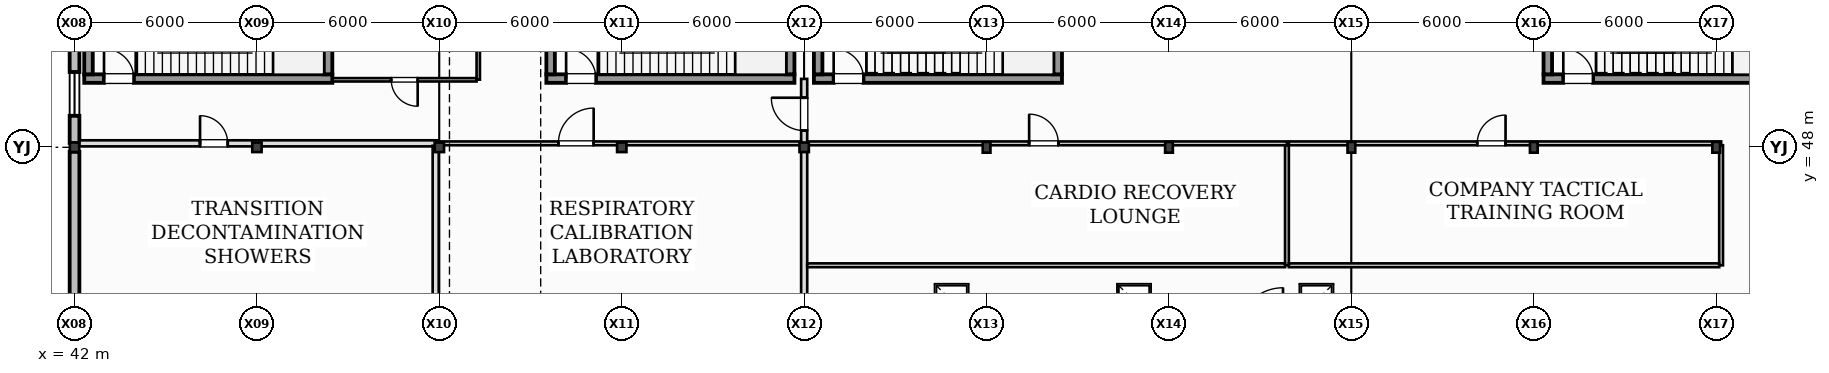
"""IFC4 building model, lengths in metres.
Left out: names, types, materials, properties, quantities, classifications, styles, units other than length and angle.
Written with IfcOpenShell. Run it as: python <this file> out.ifc"""

import sys

from ifc_helpers import new_model, si_unit, direction, frame, frame_2d, origin, origin_2d, place, context, subcontext, project, spatial, rectangle, i_section, extrude, element, fill, save


model = new_model("IFC4")
c1 = context("Model", 3, precision=1e-05, world=origin(), true_north=direction((0.0, 1.0)))
c2 = subcontext(c1, "Body", "Model", "MODEL_VIEW")
j1 = project(units=[si_unit("LENGTHUNIT", "METRE"), si_unit("PLANEANGLEUNIT", "RADIAN")], contexts=[c1])
p1 = place(None, origin())
s1 = spatial("IfcSite", under=j1, at=p1, CompositionType="ELEMENT")
p2 = place(p1, origin())
s2 = spatial("IfcBuilding", under=s1, at=p2, CompositionType="ELEMENT")
p3 = place(p2, frame((0.0, 0.0, 6.0)))
s3 = spatial("IfcBuildingStorey", under=s2, at=p3, CompositionType="ELEMENT", Elevation=6.0)
for number, where, z_axis, x_axis in (
    (1, (42.0, 48.0, 0.0), (0.0, 0.0, 1.0), (1.0, 0.0, 0.0)),
    (2, (48.0, 48.0, 0.0), (0.0, 0.0, 1.0), (1.0, 0.0, 0.0)),
    (3, (54.0, 48.0, 0.0), (0.0, 0.0, 1.0), (1.0, 0.0, 0.0)),
    (4, (60.0, 48.0, 0.0), (0.0, 0.0, 1.0), (1.0, 0.0, 0.0)),
    (5, (66.0, 48.0, 0.0), (0.0, 0.0, 1.0), (1.0, 0.0, 0.0)),
):
    element("IfcColumn", number, at=place(p3, frame(where, z_axis=z_axis, x_axis=x_axis)), inside=s3, PredefinedType="COLUMN", context=c2, shape_type="SweptSolid", body=[
        extrude(i_section(OverallWidth=0.307, OverallDepth=0.314, WebThickness=0.011, FlangeThickness=0.019, at=origin_2d()), origin(), (0.0, 0.0, 1.0), 4.0),
    ])
for number, where, z_axis, x_axis in (
    (6, (72.0, 48.0, 0.0), (0.0, 0.0, 1.0), (1.0, 0.0, 0.0)),
    (7, (78.0, 48.0, 0.0), (0.0, 0.0, 1.0), (1.0, 0.0, 0.0)),
    (8, (84.0, 48.0, 0.0), (0.0, 0.0, 1.0), (1.0, 0.0, 0.0)),
    (9, (90.0, 48.0, 0.0), (0.0, 0.0, 1.0), (1.0, 0.0, 0.0)),
    (10, (96.0, 48.0, 0.0), (0.0, 0.0, 1.0), (1.0, 0.0, 0.0)),
):
    element("IfcColumn", number, at=place(p3, frame(where, z_axis=z_axis, x_axis=x_axis)), inside=s3, PredefinedType="COLUMN", context=c2, shape_type="SweptSolid", body=[
        extrude(i_section(OverallWidth=0.254, OverallDepth=0.353, WebThickness=0.01, FlangeThickness=0.016, at=origin_2d()), origin(), (0.0, 0.0, 1.0), 4.0),
    ])
p4 = place(p3, frame((42.0, 47.855, 0.0), z_axis=(0.0, 0.0, 1.0), x_axis=(0.0, -1.0, 0.0)))
e11 = element("IfcWall", 11, at=p4, inside=s3, PredefinedType="STANDARD", context=c2, shape_type="SweptSolid", body=[
    extrude(rectangle(XDim=5.71, YDim=0.32, at=frame_2d((2.855, 0.0))), origin(), (0.0, 0.0, 1.0), 3.339),
])
p5 = place(p3, frame((42.0, 53.855, 0.0), z_axis=(0.0, 0.0, 1.0), x_axis=(0.0, -1.0, 0.0)))
e12 = element("IfcWall", 12, at=p5, inside=s3, PredefinedType="STANDARD", context=c2, shape_type="SweptSolid", body=[
    extrude(rectangle(XDim=5.71, YDim=0.32, at=frame_2d((2.855, 0.0))), origin(), (0.0, 0.0, 1.0), 3.339),
])
p6 = place(p5, frame((0.936, 0.0, 0.86)))
e13 = element("IfcOpeningElement", 13, at=p6, cuts=e12, PredefinedType="OPENING", context=c2, shape_type="SweptSolid", body=[
    extrude(rectangle(XDim=1.2, YDim=1.2, at=frame_2d((0.6, 0.6))), frame((0.0, 0.17, 0.0), z_axis=(0.0, -1.0, 0.0), x_axis=(1.0, 0.0, 0.0)), (0.0, 0.0, 1.0), 0.34),
])
p7 = place(p5, frame((3.378, 0.0, 1.42)))
e14 = element("IfcOpeningElement", 14, at=p7, cuts=e12, PredefinedType="OPENING", context=c2, shape_type="SweptSolid", body=[
    extrude(rectangle(XDim=1.44, YDim=1.44, at=frame_2d((0.72, 0.72))), frame((0.0, 0.17, 0.0), z_axis=(0.0, -1.0, 0.0), x_axis=(1.0, 0.0, 0.0)), (0.0, 0.0, 1.0), 0.34),
])
p8 = place(p3, frame((42.32, 50.26, 0.0), z_axis=(0.0, 0.0, 1.0), x_axis=(1.0, 0.0, 0.0)))
e15 = element("IfcWall", 15, at=p8, inside=s3, PredefinedType="SHEAR", context=c2, shape_type="SweptSolid", body=[
    extrude(rectangle(XDim=8.16, YDim=0.28, at=frame_2d((4.08, 0.0))), origin(), (0.0, 0.0, 1.0), 3.75),
])
p9 = place(p8, frame((0.65, 0.0, 0.0)))
e16 = element("IfcOpeningElement", 16, at=p9, cuts=e15, PredefinedType="OPENING", context=c2, shape_type="SweptSolid", body=[
    extrude(rectangle(XDim=0.98, YDim=2.15, at=frame_2d((0.49, 1.075))), frame((0.0, 0.15, 0.0), z_axis=(0.0, -1.0, 0.0), x_axis=(1.0, 0.0, 0.0)), (0.0, 0.0, 1.0), 0.3),
])
for number, where, z_axis, x_axis in (
    (17, (42.46, 53.4, 0.0), (0.0, 0.0, 1.0), (0.0, -1.0, 0.0)),
    (18, (50.34, 50.4, 0.0), (0.0, 0.0, 1.0), (0.0, 1.0, 0.0)),
):
    element("IfcWall", number, at=place(p3, frame(where, z_axis=z_axis, x_axis=x_axis)), inside=s3, PredefinedType="SHEAR", context=c2, shape_type="SweptSolid", body=[
        extrude(rectangle(XDim=3.0, YDim=0.28, at=frame_2d((1.5, 0.0))), origin(), (0.0, 0.0, 1.0), 3.75),
    ])
p10 = place(p3, frame((57.52, 50.26, 0.0), z_axis=(0.0, 0.0, 1.0), x_axis=(1.0, 0.0, 0.0)))
e19 = element("IfcWall", 19, at=p10, inside=s3, PredefinedType="SHEAR", context=c2, shape_type="SweptSolid", body=[
    extrude(rectangle(XDim=8.16, YDim=0.28, at=frame_2d((4.08, 0.0))), origin(), (0.0, 0.0, 1.0), 3.75),
])
p11 = place(p10, frame((0.65, 0.0, 0.0)))
e20 = element("IfcOpeningElement", 20, at=p11, cuts=e19, PredefinedType="OPENING", context=c2, shape_type="SweptSolid", body=[
    extrude(rectangle(XDim=0.98, YDim=2.15, at=frame_2d((0.49, 1.075))), frame((0.0, 0.15, 0.0), z_axis=(0.0, -1.0, 0.0), x_axis=(1.0, 0.0, 0.0)), (0.0, 0.0, 1.0), 0.3),
])
for number, where, z_axis, x_axis in (
    (21, (57.66, 53.4, 0.0), (0.0, 0.0, 1.0), (0.0, -1.0, 0.0)),
    (22, (65.54, 50.4, 0.0), (0.0, 0.0, 1.0), (0.0, 1.0, 0.0)),
):
    element("IfcWall", number, at=place(p3, frame(where, z_axis=z_axis, x_axis=x_axis)), inside=s3, PredefinedType="SHEAR", context=c2, shape_type="SweptSolid", body=[
        extrude(rectangle(XDim=3.0, YDim=0.28, at=frame_2d((1.5, 0.0))), origin(), (0.0, 0.0, 1.0), 3.75),
    ])
p12 = place(p3, frame((90.32, 50.26, 0.0), z_axis=(0.0, 0.0, 1.0), x_axis=(1.0, 0.0, 0.0)))
e23 = element("IfcWall", 23, at=p12, inside=s3, PredefinedType="SHEAR", context=c2, shape_type="SweptSolid", body=[
    extrude(rectangle(XDim=8.16, YDim=0.28, at=frame_2d((4.08, 0.0))), origin(), (0.0, 0.0, 1.0), 4.0),
])
p13 = place(p12, frame((0.65, 0.0, 0.0)))
e24 = element("IfcOpeningElement", 24, at=p13, cuts=e23, PredefinedType="OPENING", context=c2, shape_type="SweptSolid", body=[
    extrude(rectangle(XDim=0.98, YDim=2.15, at=frame_2d((0.49, 1.075))), frame((0.0, 0.15, 0.0), z_axis=(0.0, -1.0, 0.0), x_axis=(1.0, 0.0, 0.0)), (0.0, 0.0, 1.0), 0.3),
])
p14 = place(p3, frame((90.46, 53.4, 0.0), z_axis=(0.0, 0.0, 1.0), x_axis=(0.0, -1.0, 0.0)))
e25 = element("IfcWall", 25, at=p14, inside=s3, PredefinedType="SHEAR", context=c2, shape_type="SweptSolid", body=[
    extrude(rectangle(XDim=3.0, YDim=0.28, at=frame_2d((1.5, 0.0))), origin(), (0.0, 0.0, 1.0), 4.0),
])
p15 = place(p3, frame((66.32, 50.26, 0.0), z_axis=(0.0, 0.0, 1.0), x_axis=(1.0, 0.0, 0.0)))
e26 = element("IfcWall", 26, at=p15, inside=s3, PredefinedType="SHEAR", context=c2, shape_type="SweptSolid", body=[
    extrude(rectangle(XDim=8.16, YDim=0.28, at=frame_2d((4.08, 0.0))), origin(), (0.0, 0.0, 1.0), 4.0),
])
p16 = place(p15, frame((0.65, 0.0, 0.0)))
e27 = element("IfcOpeningElement", 27, at=p16, cuts=e26, PredefinedType="OPENING", context=c2, shape_type="SweptSolid", body=[
    extrude(rectangle(XDim=0.98, YDim=2.15, at=frame_2d((0.49, 1.075))), frame((0.0, 0.15, 0.0), z_axis=(0.0, -1.0, 0.0), x_axis=(1.0, 0.0, 0.0)), (0.0, 0.0, 1.0), 0.3),
])
for number, where, z_axis, x_axis in (
    (28, (66.46, 53.4, 0.0), (0.0, 0.0, 1.0), (0.0, -1.0, 0.0)),
    (29, (74.34, 50.4, 0.0), (0.0, 0.0, 1.0), (0.0, 1.0, 0.0)),
):
    element("IfcWall", number, at=place(p3, frame(where, z_axis=z_axis, x_axis=x_axis)), inside=s3, PredefinedType="SHEAR", context=c2, shape_type="SweptSolid", body=[
        extrude(rectangle(XDim=3.0, YDim=0.28, at=frame_2d((1.5, 0.0))), origin(), (0.0, 0.0, 1.0), 4.0),
    ])
p17 = place(p3, frame((66.0, 42.18, 0.0), z_axis=(0.0, 0.0, 1.0), x_axis=(0.0, 1.0, 0.0)))
e30 = element("IfcWall", 30, at=p17, inside=s3, PredefinedType="PARTITIONING", context=c2, shape_type="SweptSolid", body=[
    extrude(rectangle(XDim=5.72, YDim=0.2, at=frame_2d((2.86, 0.0))), origin(), (0.0, 0.0, 1.0), 3.65),
])
p18 = place(p3, frame((66.0, 48.05, 0.0), z_axis=(0.0, 0.0, 1.0), x_axis=(0.0, 1.0, 0.0)))
e31 = element("IfcWall", 31, at=p18, inside=s3, PredefinedType="PARTITIONING", context=c2, shape_type="SweptSolid", body=[
    extrude(rectangle(XDim=2.2, YDim=0.2, at=frame_2d((1.1, 0.0))), origin(), (0.0, 0.0, 1.0), 3.65),
])
p19 = place(p18, frame((0.5, 0.0, 0.0)))
e32 = element("IfcOpeningElement", 32, at=p19, cuts=e31, PredefinedType="OPENING", context=c2, shape_type="SweptSolid", body=[
    extrude(rectangle(XDim=1.08, YDim=2.14, at=frame_2d((0.54, 1.07))), frame((0.0, 0.11, 0.0), z_axis=(0.0, -1.0, 0.0), x_axis=(1.0, 0.0, 0.0)), (0.0, 0.0, 1.0), 0.22),
])
p20 = place(p3, frame((42.16, 48.13, 0.0), z_axis=(0.0, 0.0, 1.0), x_axis=(1.0, 0.0, 0.0)))
e33 = element("IfcWall", 33, at=p20, inside=s3, PredefinedType="PARTITIONING", context=c2, shape_type="SweptSolid", body=[
    extrude(rectangle(XDim=11.76, YDim=0.2, at=frame_2d((5.88, 0.0))), origin(), (0.0, 0.0, 1.0), 3.72),
])
p21 = place(p20, frame((3.969, 0.0, 0.0)))
e34 = element("IfcOpeningElement", 34, at=p21, cuts=e33, PredefinedType="OPENING", context=c2, shape_type="SweptSolid", body=[
    extrude(rectangle(XDim=0.91, YDim=2.1, at=frame_2d((0.455, 1.05))), frame((0.0, 0.11, 0.0), z_axis=(0.0, -1.0, 0.0), x_axis=(1.0, 0.0, 0.0)), (0.0, 0.0, 1.0), 0.22),
])
p22 = place(p3, frame((53.88, 48.05, 0.0), z_axis=(0.0, 0.0, 1.0), x_axis=(0.0, -1.0, 0.0)))
e35 = element("IfcWall", 35, at=p22, inside=s3, PredefinedType="PARTITIONING", context=c2, shape_type="SweptSolid", body=[
    extrude(rectangle(XDim=5.92, YDim=0.2, at=frame_2d((2.96, 0.0))), origin(), (0.0, 0.0, 1.0), 3.72),
])
p23 = place(p3, frame((53.98, 48.13, 0.0), z_axis=(0.0, 0.0, 1.0), x_axis=(1.0, 0.0, 0.0)))
e36 = element("IfcWall", 36, at=p23, inside=s3, PredefinedType="PARTITIONING", context=c2, shape_type="SweptSolid", body=[
    extrude(rectangle(XDim=11.92, YDim=0.125, at=frame_2d((5.96, 0.0))), origin(), (0.0, 0.0, 1.0), 3.72),
])
p24 = place(p23, frame((3.936, 0.0, 0.0)))
e37 = element("IfcOpeningElement", 37, at=p24, cuts=e36, PredefinedType="OPENING", context=c2, shape_type="SweptSolid", body=[
    extrude(rectangle(XDim=1.16, YDim=2.2, at=frame_2d((0.58, 1.1))), frame((0.0, 0.073, 0.0), z_axis=(0.0, -1.0, 0.0), x_axis=(1.0, 0.0, 0.0)), (0.0, 0.0, 1.0), 0.145),
])
p25 = place(p3, frame((55.28, 53.84, 0.0), z_axis=(0.0, 0.0, 1.0), x_axis=(0.0, -1.0, 0.0)))
e38 = element("IfcWall", 38, at=p25, inside=s3, PredefinedType="PARTITIONING", context=c2, shape_type="SweptSolid", body=[
    extrude(rectangle(XDim=3.615, YDim=0.11, at=frame_2d((1.808, 0.0))), origin(), (0.0, 0.0, 1.0), 3.72),
])
p26 = place(p3, frame((55.225, 50.22, 0.0), z_axis=(0.0, 0.0, 1.0), x_axis=(-1.0, 0.0, 0.0)))
e39 = element("IfcWall", 39, at=p26, inside=s3, PredefinedType="PARTITIONING", context=c2, shape_type="SweptSolid", body=[
    extrude(rectangle(XDim=4.745, YDim=0.11, at=frame_2d((2.373, 0.0))), origin(), (0.0, 0.0, 1.0), 3.72),
])
p27 = place(p26, frame((1.938, 0.0, 0.0)))
e40 = element("IfcOpeningElement", 40, at=p27, cuts=e39, PredefinedType="OPENING", context=c2, shape_type="SweptSolid", body=[
    extrude(rectangle(XDim=0.87, YDim=2.06, at=frame_2d((0.435, 1.03))), frame((0.0, 0.065, 0.0), z_axis=(0.0, -1.0, 0.0), x_axis=(1.0, 0.0, 0.0)), (0.0, 0.0, 1.0), 0.13),
])
p28 = place(p3, frame((66.1, 48.13, 0.0), z_axis=(0.0, 0.0, 1.0), x_axis=(1.0, 0.0, 0.0)))
e41 = element("IfcWall", 41, at=p28, inside=s3, PredefinedType="PARTITIONING", context=c2, shape_type="SweptSolid", body=[
    extrude(rectangle(XDim=15.782, YDim=0.125, at=frame_2d((7.891, 0.0))), origin(), (0.0, 0.0, 1.0), 3.153),
])
p29 = place(p28, frame((7.3, 0.0, 0.0)))
e42 = element("IfcOpeningElement", 42, at=p29, cuts=e41, PredefinedType="OPENING", context=c2, shape_type="SweptSolid", body=[
    extrude(rectangle(XDim=0.96, YDim=2.15, at=frame_2d((0.48, 1.075))), frame((0.0, 0.073, 0.0), z_axis=(0.0, -1.0, 0.0), x_axis=(1.0, 0.0, 0.0)), (0.0, 0.0, 1.0), 0.145),
])
p30 = place(p3, frame((81.88, 48.067, 0.0), z_axis=(0.0, 0.0, 1.0), x_axis=(0.0, -1.0, 0.0)))
e43 = element("IfcWall", 43, at=p30, inside=s3, PredefinedType="PARTITIONING", context=c2, shape_type="SweptSolid", body=[
    extrude(rectangle(XDim=3.95, YDim=0.125, at=frame_2d((1.975, 0.0))), origin(), (0.0, 0.0, 1.0), 3.43),
])
p31 = place(p3, frame((81.817, 44.12, 0.0), z_axis=(0.0, 0.0, 1.0), x_axis=(-1.0, 0.0, 0.0)))
e44 = element("IfcWall", 44, at=p31, inside=s3, PredefinedType="PARTITIONING", context=c2, shape_type="SweptSolid", body=[
    extrude(rectangle(XDim=15.717, YDim=0.125, at=frame_2d((7.859, 0.0))), origin(), (0.0, 0.0, 1.0), 3.72),
])
p32 = place(p3, frame((81.942, 48.13, 0.0), z_axis=(0.0, 0.0, 1.0), x_axis=(1.0, 0.0, 0.0)))
e45 = element("IfcWall", 45, at=p32, inside=s3, PredefinedType="PARTITIONING", context=c2, shape_type="SweptSolid", body=[
    extrude(rectangle(XDim=14.22, YDim=0.125, at=frame_2d((7.11, 0.0))), origin(), (0.0, 0.0, 1.0), 3.153),
])
p33 = place(p32, frame((6.198, 0.0, 0.0)))
e46 = element("IfcOpeningElement", 46, at=p33, cuts=e45, PredefinedType="OPENING", context=c2, shape_type="SweptSolid", body=[
    extrude(rectangle(XDim=0.93, YDim=2.1, at=frame_2d((0.465, 1.05))), frame((0.0, 0.073, 0.0), z_axis=(0.0, -1.0, 0.0), x_axis=(1.0, 0.0, 0.0)), (0.0, 0.0, 1.0), 0.145),
])
p34 = place(p3, frame((96.16, 48.067, 0.0), z_axis=(0.0, 0.0, 1.0), x_axis=(0.0, -1.0, 0.0)))
e47 = element("IfcWall", 47, at=p34, inside=s3, PredefinedType="PARTITIONING", context=c2, shape_type="SweptSolid", body=[
    extrude(rectangle(XDim=3.95, YDim=0.125, at=frame_2d((1.975, 0.0))), origin(), (0.0, 0.0, 1.0), 3.157),
])
p35 = place(p3, frame((96.097, 44.12, 0.0), z_axis=(0.0, 0.0, 1.0), x_axis=(-1.0, 0.0, 0.0)))
e48 = element("IfcWall", 48, at=p35, inside=s3, PredefinedType="PARTITIONING", context=c2, shape_type="SweptSolid", body=[
    extrude(rectangle(XDim=14.155, YDim=0.125, at=frame_2d((7.078, 0.0))), origin(), (0.0, 0.0, 1.0), 3.72),
])
p36 = place(p7, origin())
e49 = element("IfcWindow", 49, at=p36, inside=s3, PartitioningType="SINGLE_PANEL", PredefinedType="WINDOW", context=c2, shape_type="SweptSolid", body=[
    extrude(rectangle(XDim=1.44, YDim=1.44, at=frame_2d((0.72, 0.72))), frame((0.0, 0.03, 0.0), z_axis=(0.0, -1.0, 0.0), x_axis=(1.0, 0.0, 0.0)), (0.0, 0.0, 1.0), 0.06),
])
fill(e14, e49)
p37 = place(p9, origin())
e50 = element("IfcDoor", 50, at=p37, inside=s3, OperationType="SINGLE_SWING_LEFT", PredefinedType="DOOR", context=c2, shape_type="SweptSolid", body=[
    extrude(rectangle(XDim=0.98, YDim=2.15, at=frame_2d((0.49, 1.075))), frame((0.0, 0.025, 0.0), z_axis=(0.0, -1.0, 0.0), x_axis=(1.0, 0.0, 0.0)), (0.0, 0.0, 1.0), 0.05),
])
fill(e16, e50)
p38 = place(p11, origin())
e51 = element("IfcDoor", 51, at=p38, inside=s3, OperationType="SINGLE_SWING_LEFT", PredefinedType="DOOR", context=c2, shape_type="SweptSolid", body=[
    extrude(rectangle(XDim=0.98, YDim=2.15, at=frame_2d((0.49, 1.075))), frame((0.0, 0.025, 0.0), z_axis=(0.0, -1.0, 0.0), x_axis=(1.0, 0.0, 0.0)), (0.0, 0.0, 1.0), 0.05),
])
fill(e20, e51)
p39 = place(p13, origin())
e52 = element("IfcDoor", 52, at=p39, inside=s3, OperationType="SINGLE_SWING_LEFT", PredefinedType="DOOR", context=c2, shape_type="SweptSolid", body=[
    extrude(rectangle(XDim=0.98, YDim=2.15, at=frame_2d((0.49, 1.075))), frame((0.0, 0.025, 0.0), z_axis=(0.0, -1.0, 0.0), x_axis=(1.0, 0.0, 0.0)), (0.0, 0.0, 1.0), 0.05),
])
fill(e24, e52)
p40 = place(p16, origin())
e53 = element("IfcDoor", 53, at=p40, inside=s3, OperationType="SINGLE_SWING_LEFT", PredefinedType="DOOR", context=c2, shape_type="SweptSolid", body=[
    extrude(rectangle(XDim=0.98, YDim=2.15, at=frame_2d((0.49, 1.075))), frame((0.0, 0.025, 0.0), z_axis=(0.0, -1.0, 0.0), x_axis=(1.0, 0.0, 0.0)), (0.0, 0.0, 1.0), 0.05),
])
fill(e27, e53)
p41 = place(p19, frame((1.08, 0.0, 0.0), z_axis=(0.0, 0.0, 1.0), x_axis=(-1.0, 0.0, 0.0)))
e54 = element("IfcDoor", 54, at=p41, inside=s3, OperationType="SINGLE_SWING_RIGHT", PredefinedType="DOOR", context=c2, shape_type="SweptSolid", body=[
    extrude(rectangle(XDim=1.08, YDim=2.14, at=frame_2d((0.54, 1.07))), frame((0.0, 0.025, 0.0), z_axis=(0.0, -1.0, 0.0), x_axis=(1.0, 0.0, 0.0)), (0.0, 0.0, 1.0), 0.05),
])
fill(e32, e54)
p42 = place(p21, frame((0.91, 0.0, 0.0), z_axis=(0.0, 0.0, 1.0), x_axis=(-1.0, 0.0, 0.0)))
e55 = element("IfcDoor", 55, at=p42, inside=s3, OperationType="SINGLE_SWING_LEFT", PredefinedType="DOOR", context=c2, shape_type="SweptSolid", body=[
    extrude(rectangle(XDim=0.91, YDim=2.1, at=frame_2d((0.455, 1.05))), frame((0.0, 0.025, 0.0), z_axis=(0.0, -1.0, 0.0), x_axis=(1.0, 0.0, 0.0)), (0.0, 0.0, 1.0), 0.05),
])
fill(e34, e55)
p43 = place(p24, frame((1.16, 0.0, 0.0), z_axis=(0.0, 0.0, 1.0), x_axis=(-1.0, 0.0, 0.0)))
e56 = element("IfcDoor", 56, at=p43, inside=s3, OperationType="SINGLE_SWING_RIGHT", PredefinedType="DOOR", context=c2, shape_type="SweptSolid", body=[
    extrude(rectangle(XDim=1.16, YDim=2.2, at=frame_2d((0.58, 1.1))), frame((0.0, 0.025, 0.0), z_axis=(0.0, -1.0, 0.0), x_axis=(1.0, 0.0, 0.0)), (0.0, 0.0, 1.0), 0.05),
])
fill(e37, e56)
p44 = place(p27, frame((0.87, 0.0, 0.0), z_axis=(0.0, 0.0, 1.0), x_axis=(-1.0, 0.0, 0.0)))
e57 = element("IfcDoor", 57, at=p44, inside=s3, OperationType="SINGLE_SWING_LEFT", PredefinedType="DOOR", context=c2, shape_type="SweptSolid", body=[
    extrude(rectangle(XDim=0.87, YDim=2.06, at=frame_2d((0.435, 1.03))), frame((0.0, 0.025, 0.0), z_axis=(0.0, -1.0, 0.0), x_axis=(1.0, 0.0, 0.0)), (0.0, 0.0, 1.0), 0.05),
])
fill(e40, e57)
p45 = place(p29, frame((0.96, 0.0, 0.0), z_axis=(0.0, 0.0, 1.0), x_axis=(-1.0, 0.0, 0.0)))
e58 = element("IfcDoor", 58, at=p45, inside=s3, OperationType="SINGLE_SWING_LEFT", PredefinedType="DOOR", context=c2, shape_type="SweptSolid", body=[
    extrude(rectangle(XDim=0.96, YDim=2.15, at=frame_2d((0.48, 1.075))), frame((0.0, 0.025, 0.0), z_axis=(0.0, -1.0, 0.0), x_axis=(1.0, 0.0, 0.0)), (0.0, 0.0, 1.0), 0.05),
])
fill(e42, e58)
p46 = place(p33, frame((0.93, 0.0, 0.0), z_axis=(0.0, 0.0, 1.0), x_axis=(-1.0, 0.0, 0.0)))
e59 = element("IfcDoor", 59, at=p46, inside=s3, OperationType="SINGLE_SWING_RIGHT", PredefinedType="DOOR", context=c2, shape_type="SweptSolid", body=[
    extrude(rectangle(XDim=0.93, YDim=2.1, at=frame_2d((0.465, 1.05))), frame((0.0, 0.025, 0.0), z_axis=(0.0, -1.0, 0.0), x_axis=(1.0, 0.0, 0.0)), (0.0, 0.0, 1.0), 0.05),
])
fill(e46, e59)
save(model, sys.argv[1])
